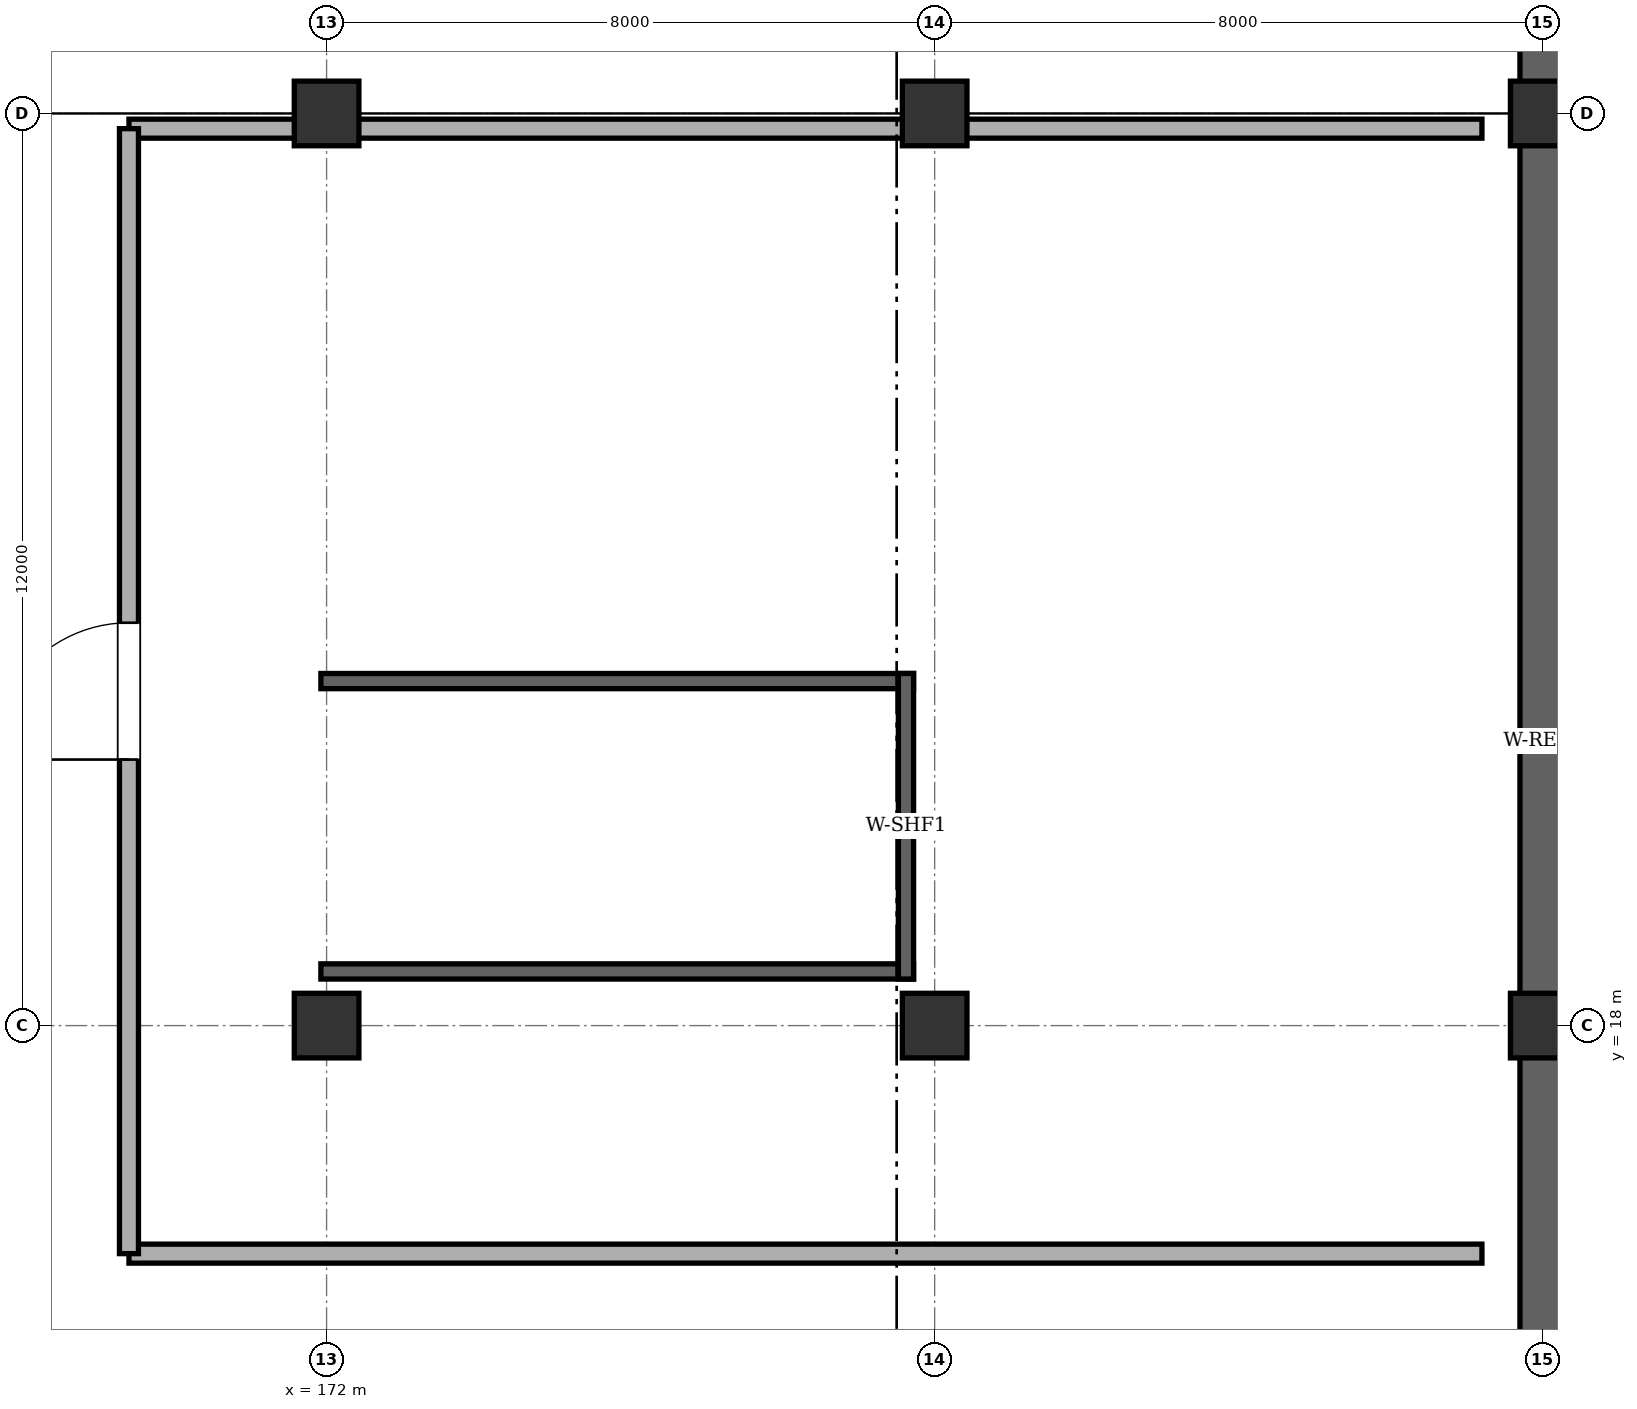
"""IFC4 building model, lengths in metres.
Left out: names, types, materials, properties, quantities, classifications, styles, units other than length and angle.
Written with IfcOpenShell. Run it as: python <this file> out.ifc"""

import sys

from ifc_helpers import new_model, si_unit, direction, frame, frame_2d, origin, origin_2d, place, context, subcontext, project, spatial, rectangle, extrude, element, fill, save


model = new_model("IFC4")
c1 = context("Model", 3, precision=1e-05, world=origin(), true_north=direction((0.0, 1.0)))
c2 = subcontext(c1, "Body", "Model", "MODEL_VIEW")
j1 = project(units=[si_unit("LENGTHUNIT", "METRE"), si_unit("PLANEANGLEUNIT", "RADIAN")], contexts=[c1])
p1 = place(None, origin())
s1 = spatial("IfcSite", under=j1, at=p1, CompositionType="ELEMENT")
p2 = place(p1, origin())
s2 = spatial("IfcBuilding", under=s1, at=p2, CompositionType="ELEMENT")
p3 = place(p2, frame((0.0, 0.0, -5.4)))
s3 = spatial("IfcBuildingStorey", under=s2, at=p3, CompositionType="ELEMENT", Elevation=-5.4)
for number, where, z_axis, x_axis in (
    (1, (172.0, 18.0, 0.0), (0.0, 0.0, 1.0), (1.0, 0.0, 0.0)),
    (2, (172.0, 30.0, 0.0), (0.0, 0.0, 1.0), (1.0, 0.0, 0.0)),
    (3, (180.0, 18.0, 0.0), (0.0, 0.0, 1.0), (1.0, 0.0, 0.0)),
    (4, (180.0, 30.0, 0.0), (0.0, 0.0, 1.0), (1.0, 0.0, 0.0)),
    (5, (188.0, 18.0, 0.0), (0.0, 0.0, 1.0), (1.0, 0.0, 0.0)),
    (6, (188.0, 30.0, 0.0), (0.0, 0.0, 1.0), (1.0, 0.0, 0.0)),
):
    element("IfcColumn", number, at=place(p3, frame(where, z_axis=z_axis, x_axis=x_axis)), inside=s3, PredefinedType="COLUMN", context=c2, shape_type="SweptSolid", body=[
        extrude(rectangle(XDim=0.85, YDim=0.85, at=origin_2d()), origin(), (0.0, 0.0, 1.0), 5.4),
    ])
p4 = place(p3, frame((188.0, 0.0, 0.0), z_axis=(0.0, 0.0, 1.0), x_axis=(0.0, 1.0, 0.0)))
e7 = element("IfcWall", 7, at=p4, inside=s3, PredefinedType="USERDEFINED", context=c2, shape_type="SweptSolid", body=[
    extrude(rectangle(XDim=56.2, YDim=0.6, at=frame_2d((28.1, 0.0))), origin(), (0.0, 0.0, 1.0), 5.1),
])
for number, where, z_axis, x_axis in (
    (8, (171.925, 18.712, 0.0), (0.0, 0.0, 1.0), (1.0, 0.0, 0.0)),
    (9, (179.722, 22.532, 0.0), (0.0, 0.0, 1.0), (-1.0, 0.0, 0.0)),
):
    element("IfcWall", number, at=place(p3, frame(where, z_axis=z_axis, x_axis=x_axis)), inside=s3, PredefinedType="SOLIDWALL", context=c2, shape_type="SweptSolid", body=[
        extrude(rectangle(XDim=7.797, YDim=0.2, at=frame_2d((3.899, 0.0))), origin(), (0.0, 0.0, 1.0), 5.1),
    ])
p5 = place(p3, frame((179.623, 18.613, 0.0), z_axis=(0.0, 0.0, 1.0), x_axis=(0.0, 1.0, 0.0)))
e10 = element("IfcWall", 10, at=p5, inside=s3, PredefinedType="SOLIDWALL", context=c2, shape_type="SweptSolid", body=[
    extrude(rectangle(XDim=4.02, YDim=0.2, at=frame_2d((2.01, 0.0))), origin(), (0.0, 0.0, 1.0), 5.1),
])
for number, where, z_axis, x_axis in (
    (11, (187.2, 15.0, 0.0), (0.0, 0.0, 1.0), (-1.0, 0.0, 0.0)),
    (12, (169.4, 29.8, 0.0), (0.0, 0.0, 1.0), (1.0, 0.0, 0.0)),
):
    element("IfcWall", number, at=place(p3, frame(where, z_axis=z_axis, x_axis=x_axis)), inside=s3, PredefinedType="SOLIDWALL", context=c2, shape_type="SweptSolid", body=[
        extrude(rectangle(XDim=17.8, YDim=0.25, at=frame_2d((8.9, 0.0))), origin(), (0.0, 0.0, 1.0), 4.4),
    ])
p6 = place(p3, frame((169.4, 15.0, 0.0), z_axis=(0.0, 0.0, 1.0), x_axis=(0.0, 1.0, 0.0)))
e13 = element("IfcWall", 13, at=p6, inside=s3, PredefinedType="SOLIDWALL", context=c2, shape_type="SweptSolid", body=[
    extrude(rectangle(XDim=14.8, YDim=0.25, at=frame_2d((7.4, 0.0))), origin(), (0.0, 0.0, 1.0), 4.4),
])
p7 = place(p6, frame((6.5, 0.0, 0.0)))
e14 = element("IfcOpeningElement", 14, at=p7, cuts=e13, PredefinedType="OPENING", context=c2, shape_type="SweptSolid", body=[
    extrude(rectangle(XDim=1.8, YDim=2.2, at=frame_2d((0.9, 1.1))), frame((0.0, 0.135, 0.0), z_axis=(0.0, -1.0, 0.0), x_axis=(1.0, 0.0, 0.0)), (0.0, 0.0, 1.0), 0.27),
])
p8 = place(p7, origin())
e15 = element("IfcDoor", 15, at=p8, inside=s3, OperationType="SINGLE_SWING_LEFT", PredefinedType="DOOR", context=c2, shape_type="SweptSolid", body=[
    extrude(rectangle(XDim=1.8, YDim=2.2, at=frame_2d((0.9, 1.1))), frame((0.0, 0.025, 0.0), z_axis=(0.0, -1.0, 0.0), x_axis=(1.0, 0.0, 0.0)), (0.0, 0.0, 1.0), 0.05),
])
fill(e14, e15)
save(model, sys.argv[1])
